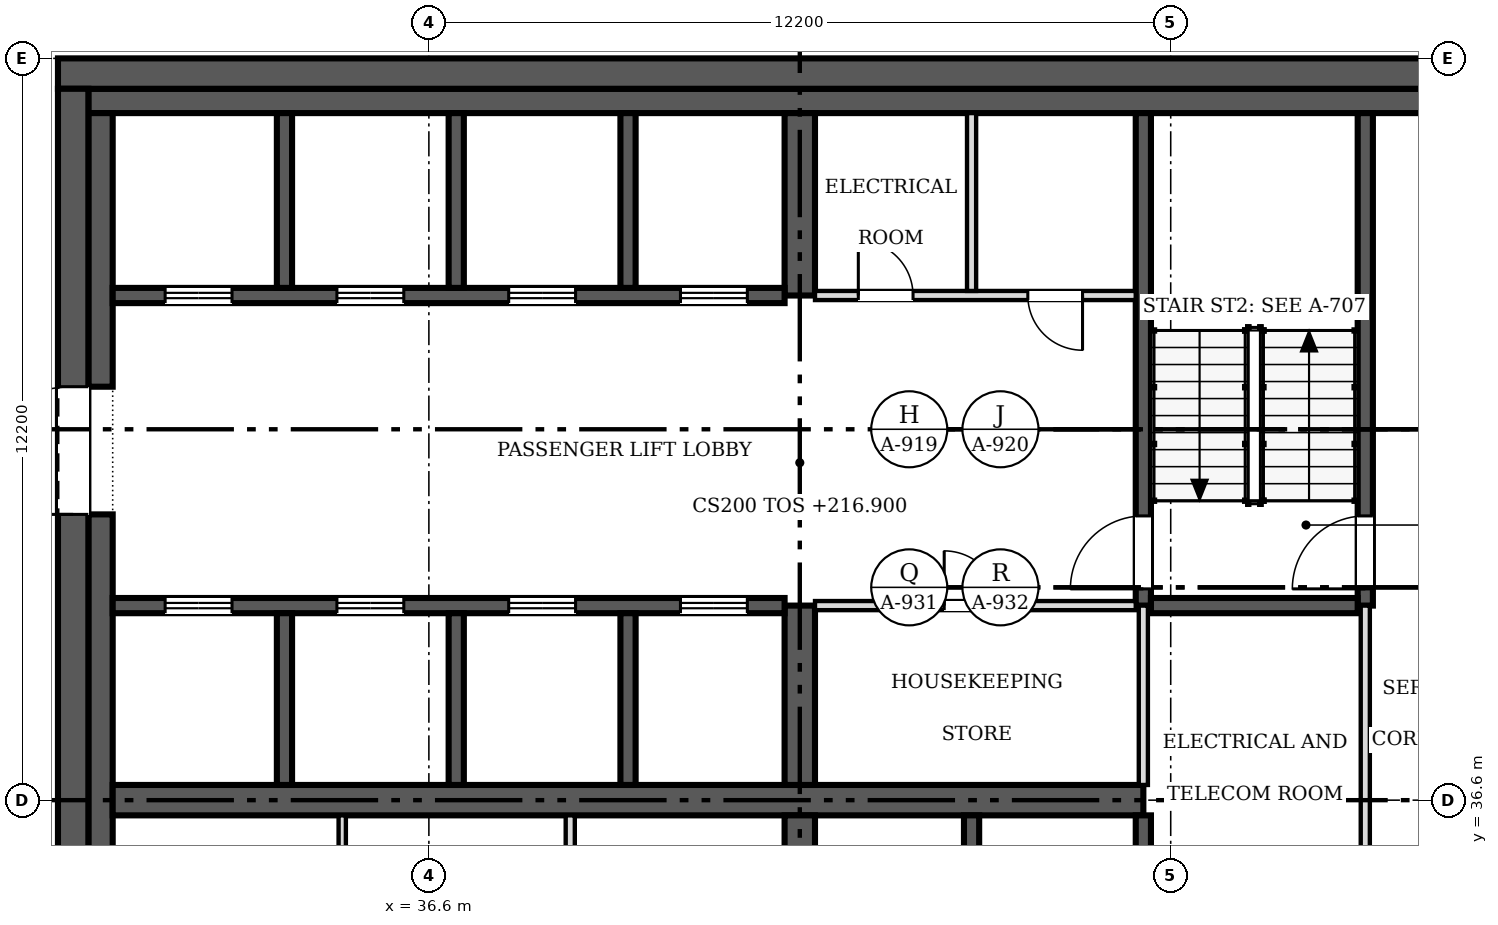
"""IFC4 building model, lengths in metres.
Left out: names, types, materials, properties, quantities, classifications, styles, units other than length and angle.
Written with IfcOpenShell. Run it as: python <this file> out.ifc"""

import sys

from ifc_helpers import new_model, si_unit, direction, frame, frame_2d, origin, place, context, subcontext, project, spatial, rectangle, extrude, source, transform, mapped, element, fill, save


model = new_model("IFC4")
c1 = context("Model", 3, precision=1e-05, world=origin(), true_north=direction((0.0, 1.0)))
c2 = subcontext(c1, "Body", "Model", "MODEL_VIEW")
j1 = project(units=[si_unit("LENGTHUNIT", "METRE"), si_unit("PLANEANGLEUNIT", "RADIAN")], contexts=[c1])
p1 = place(None, origin())
s1 = spatial("IfcSite", under=j1, at=p1, CompositionType="ELEMENT")
p2 = place(p1, origin())
s2 = spatial("IfcBuilding", under=s1, at=p2, CompositionType="ELEMENT")
p3 = place(p2, frame((0.0, 0.0, 216.9)))
s3 = spatial("IfcBuildingStorey", under=s2, at=p3, CompositionType="ELEMENT", Elevation=216.9)
p4 = place(p3, frame((30.75, 24.9, 0.0), z_axis=(0.0, 0.0, 1.0), x_axis=(0.0, 1.0, 0.0)))
e1 = element("IfcWall", 1, at=p4, inside=s3, PredefinedType="SHEAR", context=c2, shape_type="SweptSolid", body=[
    extrude(rectangle(XDim=23.4, YDim=0.5, at=frame_2d((11.7, 0.0))), origin(), (0.0, 0.0, 1.0), 3.8),
])
m1 = source(origin(), c2, "Body", "SweptSolid", [
    extrude(rectangle(XDim=2.1, YDim=2.4, at=frame_2d((1.05, 1.2))), frame((0.0, 0.26, 0.0), z_axis=(0.0, -1.0, 0.0), x_axis=(1.0, 0.0, 0.0)), (0.0, 0.0, 1.0), 0.52),
])
p5 = place(p4, frame((4.9, 0.0, 0.0)))
e2 = element("IfcOpeningElement", 2, at=p5, cuts=e1, PredefinedType="OPENING", context=c2, shape_type="MappedRepresentation", body=[
    mapped(m1, transform((0.0, 0.0, 0.0), scale=1.0)),
])
p6 = place(p4, frame((16.4, 0.0, 0.0)))
e3 = element("IfcOpeningElement", 3, at=p6, cuts=e1, PredefinedType="OPENING", context=c2, shape_type="MappedRepresentation", body=[
    mapped(m1, transform((0.0, 0.0, 0.0), scale=1.0)),
])
p7 = place(p3, frame((30.5, 48.55, 0.0), z_axis=(0.0, 0.0, 1.0), x_axis=(1.0, 0.0, 0.0)))
e4 = element("IfcWall", 4, at=p7, inside=s3, PredefinedType="SHEAR", context=c2, shape_type="SweptSolid", body=[
    extrude(rectangle(XDim=24.4, YDim=0.5, at=frame_2d((12.2, 0.0))), origin(), (0.0, 0.0, 1.0), 3.8),
])
p8 = place(p3, frame((31.0, 48.1, 0.0), z_axis=(0.0, 0.0, 1.0), x_axis=(1.0, 0.0, 0.0)))
e5 = element("IfcWall", 5, at=p8, inside=s3, PredefinedType="SOLIDWALL", context=c2, shape_type="SweptSolid", body=[
    extrude(rectangle(XDim=23.4, YDim=0.4, at=frame_2d((11.7, 0.0))), origin(), (0.0, 0.0, 1.0), 3.8),
])
p9 = place(p3, frame((31.2, 31.9, 0.0), z_axis=(0.0, 0.0, 1.0), x_axis=(0.0, 1.0, 0.0)))
e6 = element("IfcWall", 6, at=p9, inside=s3, PredefinedType="SOLIDWALL", context=c2, shape_type="SweptSolid", body=[
    extrude(rectangle(XDim=9.4, YDim=0.4, at=frame_2d((4.7, 0.0))), origin(), (0.0, 0.0, 1.0), 3.8),
])
p10 = place(p3, frame((31.2, 43.4, 0.0), z_axis=(0.0, 0.0, 1.0), x_axis=(0.0, 1.0, 0.0)))
e7 = element("IfcWall", 7, at=p10, inside=s3, PredefinedType="SOLIDWALL", context=c2, shape_type="SweptSolid", body=[
    extrude(rectangle(XDim=4.5, YDim=0.4, at=frame_2d((2.25, 0.0))), origin(), (0.0, 0.0, 1.0), 3.8),
])
p11 = place(p3, frame((31.4, 36.6, 0.0), z_axis=(0.0, 0.0, 1.0), x_axis=(1.0, 0.0, 0.0)))
e8 = element("IfcWall", 8, at=p11, inside=s3, PredefinedType="SHEAR", context=c2, shape_type="SweptSolid", body=[
    extrude(rectangle(XDim=16.95, YDim=0.5, at=frame_2d((8.475, 0.0))), origin(), (0.0, 0.0, 1.0), 3.8),
])
p12 = place(p3, frame((42.7, 36.35, 0.0), z_axis=(0.0, 0.0, 1.0), x_axis=(0.0, -1.0, 0.0)))
e9 = element("IfcWall", 9, at=p12, inside=s3, PredefinedType="SHEAR", context=c2, shape_type="SweptSolid", body=[
    extrude(rectangle(XDim=11.05, YDim=0.5, at=frame_2d((5.525, 0.0))), origin(), (0.0, 0.0, 1.0), 3.8),
])
m2 = source(origin(), c2, "Body", "SweptSolid", [
    extrude(rectangle(XDim=0.9, YDim=2.1, at=frame_2d((0.45, 1.05))), frame((0.0, 0.26, 0.0), z_axis=(0.0, -1.0, 0.0), x_axis=(1.0, 0.0, 0.0)), (0.0, 0.0, 1.0), 0.52),
])
p13 = place(p12, frame((6.5, 0.0, 0.0)))
e10 = element("IfcOpeningElement", 10, at=p13, cuts=e9, PredefinedType="OPENING", context=c2, shape_type="MappedRepresentation", body=[
    mapped(m2, transform((0.0, 0.0, 0.0), scale=1.0)),
])
m3 = source(origin(), c2, "Body", "SweptSolid", [
    extrude(rectangle(XDim=1.1, YDim=2.1, at=frame_2d((0.55, 1.05))), frame((0.0, 0.26, 0.0), z_axis=(0.0, -1.0, 0.0), x_axis=(1.0, 0.0, 0.0)), (0.0, 0.0, 1.0), 0.52),
])
p14 = place(p12, frame((3.8, 0.0, 0.0)))
e11 = element("IfcOpeningElement", 11, at=p14, cuts=e9, PredefinedType="OPENING", context=c2, shape_type="MappedRepresentation", body=[
    mapped(m3, transform((0.0, 0.0, 0.0), scale=1.0)),
])
p15 = place(p3, frame((42.7, 36.85, 0.0), z_axis=(0.0, 0.0, 1.0), x_axis=(0.0, 1.0, 0.0)))
e12 = element("IfcWall", 12, at=p15, inside=s3, PredefinedType="SHEAR", context=c2, shape_type="SweptSolid", body=[
    extrude(rectangle(XDim=2.95, YDim=0.5, at=frame_2d((1.475, 0.0))), origin(), (0.0, 0.0, 1.0), 3.8),
])
p16 = place(p3, frame((42.7, 44.9, 0.0), z_axis=(0.0, 0.0, 1.0), x_axis=(0.0, 1.0, 0.0)))
e13 = element("IfcWall", 13, at=p16, inside=s3, PredefinedType="SHEAR", context=c2, shape_type="SweptSolid", body=[
    extrude(rectangle(XDim=3.0, YDim=0.5, at=frame_2d((1.5, 0.0))), origin(), (0.0, 0.0, 1.0), 3.8),
])
p17 = place(p3, frame((31.4, 39.8, 0.0), z_axis=(0.0, 0.0, 1.0), x_axis=(1.0, 0.0, 0.0)))
e14 = element("IfcWall", 14, at=p17, inside=s3, PredefinedType="SOLIDWALL", context=c2, shape_type="SweptSolid", body=[
    extrude(rectangle(XDim=11.05, YDim=0.25, at=frame_2d((5.525, 0.0))), origin(), (0.0, 0.0, 1.0), 3.8),
])
m4 = source(origin(), c2, "Body", "SweptSolid", [
    extrude(rectangle(XDim=1.1, YDim=2.1, at=frame_2d((0.55, 1.05))), frame((0.0, 0.135, 0.0), z_axis=(0.0, -1.0, 0.0), x_axis=(1.0, 0.0, 0.0)), (0.0, 0.0, 1.0), 0.27),
])
p18 = place(p17, frame((0.863, 0.0, 0.0)))
e15 = element("IfcOpeningElement", 15, at=p18, cuts=e14, PredefinedType="OPENING", context=c2, shape_type="MappedRepresentation", body=[
    mapped(m4, transform((0.0, 0.0, 0.0), scale=1.0)),
])
p19 = place(p17, frame((3.688, 0.0, 0.0)))
e16 = element("IfcOpeningElement", 16, at=p19, cuts=e14, PredefinedType="OPENING", context=c2, shape_type="MappedRepresentation", body=[
    mapped(m4, transform((0.0, 0.0, 0.0), scale=1.0)),
])
p20 = place(p17, frame((6.512, 0.0, 0.0)))
e17 = element("IfcOpeningElement", 17, at=p20, cuts=e14, PredefinedType="OPENING", context=c2, shape_type="MappedRepresentation", body=[
    mapped(m4, transform((0.0, 0.0, 0.0), scale=1.0)),
])
p21 = place(p17, frame((9.337, 0.0, 0.0)))
e18 = element("IfcOpeningElement", 18, at=p21, cuts=e14, PredefinedType="OPENING", context=c2, shape_type="MappedRepresentation", body=[
    mapped(m4, transform((0.0, 0.0, 0.0), scale=1.0)),
])
p22 = place(p3, frame((42.45, 44.9, 0.0), z_axis=(0.0, 0.0, 1.0), x_axis=(-1.0, 0.0, 0.0)))
e19 = element("IfcWall", 19, at=p22, inside=s3, PredefinedType="SOLIDWALL", context=c2, shape_type="SweptSolid", body=[
    extrude(rectangle(XDim=11.05, YDim=0.25, at=frame_2d((5.525, 0.0))), origin(), (0.0, 0.0, 1.0), 3.8),
])
p23 = place(p22, frame((9.087, 0.0, 0.0)))
e20 = element("IfcOpeningElement", 20, at=p23, cuts=e19, PredefinedType="OPENING", context=c2, shape_type="MappedRepresentation", body=[
    mapped(m4, transform((0.0, 0.0, 0.0), scale=1.0)),
])
p24 = place(p22, frame((6.262, 0.0, 0.0)))
e21 = element("IfcOpeningElement", 21, at=p24, cuts=e19, PredefinedType="OPENING", context=c2, shape_type="MappedRepresentation", body=[
    mapped(m4, transform((0.0, 0.0, 0.0), scale=1.0)),
])
p25 = place(p22, frame((3.438, 0.0, 0.0)))
e22 = element("IfcOpeningElement", 22, at=p25, cuts=e19, PredefinedType="OPENING", context=c2, shape_type="MappedRepresentation", body=[
    mapped(m4, transform((0.0, 0.0, 0.0), scale=1.0)),
])
p26 = place(p22, frame((0.613, 0.0, 0.0)))
e23 = element("IfcOpeningElement", 23, at=p26, cuts=e19, PredefinedType="OPENING", context=c2, shape_type="MappedRepresentation", body=[
    mapped(m4, transform((0.0, 0.0, 0.0), scale=1.0)),
])
p27 = place(p3, frame((48.35, 36.35, 0.0), z_axis=(0.0, 0.0, 1.0), x_axis=(0.0, -1.0, 0.0)))
e24 = element("IfcWall", 24, at=p27, inside=s3, PredefinedType="SOLIDWALL", context=c2, shape_type="SweptSolid", body=[
    extrude(rectangle(XDim=11.05, YDim=0.25, at=frame_2d((5.525, 0.0))), origin(), (0.0, 0.0, 1.0), 3.8),
])
m5 = source(origin(), c2, "Body", "SweptSolid", [
    extrude(rectangle(XDim=1.2, YDim=2.1, at=frame_2d((0.6, 1.05))), frame((0.0, 0.135, 0.0), z_axis=(0.0, -1.0, 0.0), x_axis=(1.0, 0.0, 0.0)), (0.0, 0.0, 1.0), 0.27),
])
p28 = place(p27, frame((3.225, 0.0, 0.0)))
e25 = element("IfcOpeningElement", 25, at=p28, cuts=e24, PredefinedType="OPENING", context=c2, shape_type="MappedRepresentation", body=[
    mapped(m5, transform((0.0, 0.0, 0.0), scale=1.0)),
])
p29 = place(p3, frame((48.35, 47.9, 0.0), z_axis=(0.0, 0.0, 1.0), x_axis=(0.0, -1.0, 0.0)))
e26 = element("IfcWall", 26, at=p29, inside=s3, PredefinedType="SOLIDWALL", context=c2, shape_type="SweptSolid", body=[
    extrude(rectangle(XDim=8.1, YDim=0.25, at=frame_2d((4.05, 0.0))), origin(), (0.0, 0.0, 1.0), 3.8),
])
p30 = place(p29, frame((6.625, 0.0, 0.0)))
e27 = element("IfcOpeningElement", 27, at=p30, cuts=e26, PredefinedType="OPENING", context=c2, shape_type="MappedRepresentation", body=[
    mapped(m5, transform((0.0, 0.0, 0.0), scale=1.0)),
])
p31 = place(p3, frame((52.0, 39.8, 0.0), z_axis=(0.0, 0.0, 1.0), x_axis=(0.0, 1.0, 0.0)))
e28 = element("IfcWall", 28, at=p31, inside=s3, PredefinedType="SOLIDWALL", context=c2, shape_type="SweptSolid", body=[
    extrude(rectangle(XDim=8.1, YDim=0.25, at=frame_2d((4.05, 0.0))), origin(), (0.0, 0.0, 1.0), 3.8),
])
p32 = place(p31, frame((0.275, 0.0, 0.0)))
e29 = element("IfcOpeningElement", 29, at=p32, cuts=e28, PredefinedType="OPENING", context=c2, shape_type="MappedRepresentation", body=[
    mapped(m5, transform((0.0, 0.0, 0.0), scale=1.0)),
])
p33 = place(p3, frame((48.475, 39.8, 0.0), z_axis=(0.0, 0.0, 1.0), x_axis=(1.0, 0.0, 0.0)))
e30 = element("IfcWall", 30, at=p33, inside=s3, PredefinedType="SOLIDWALL", context=c2, shape_type="SweptSolid", body=[
    extrude(rectangle(XDim=3.4, YDim=0.25, at=frame_2d((1.7, 0.0))), origin(), (0.0, 0.0, 1.0), 3.8),
])
for number, where, z_axis, x_axis in (
    (31, (34.225, 36.85, 0.0), (0.0, 0.0, 1.0), (0.0, 1.0, 0.0)),
    (32, (37.05, 36.85, 0.0), (0.0, 0.0, 1.0), (0.0, 1.0, 0.0)),
    (33, (39.875, 36.85, 0.0), (0.0, 0.0, 1.0), (0.0, 1.0, 0.0)),
):
    element("IfcWall", number, at=place(p3, frame(where, z_axis=z_axis, x_axis=x_axis)), inside=s3, PredefinedType="SOLIDWALL", context=c2, shape_type="SweptSolid", body=[
        extrude(rectangle(XDim=2.825, YDim=0.25, at=frame_2d((1.413, 0.0))), origin(), (0.0, 0.0, 1.0), 3.8),
    ])
p34 = place(p3, frame((45.525, 33.525, 0.0), z_axis=(0.0, 0.0, 1.0), x_axis=(0.0, 1.0, 0.0)))
e34 = element("IfcWall", 34, at=p34, inside=s3, PredefinedType="SOLIDWALL", context=c2, shape_type="SweptSolid", body=[
    extrude(rectangle(XDim=2.825, YDim=0.25, at=frame_2d((1.413, 0.0))), origin(), (0.0, 0.0, 1.0), 3.8),
])
for number, where, z_axis, x_axis in (
    (35, (34.225, 45.025, 0.0), (0.0, 0.0, 1.0), (0.0, 1.0, 0.0)),
    (36, (37.05, 45.025, 0.0), (0.0, 0.0, 1.0), (0.0, 1.0, 0.0)),
    (37, (39.875, 45.025, 0.0), (0.0, 0.0, 1.0), (0.0, 1.0, 0.0)),
):
    element("IfcWall", number, at=place(p3, frame(where, z_axis=z_axis, x_axis=x_axis)), inside=s3, PredefinedType="SOLIDWALL", context=c2, shape_type="SweptSolid", body=[
        extrude(rectangle(XDim=2.875, YDim=0.25, at=frame_2d((1.438, 0.0))), origin(), (0.0, 0.0, 1.0), 3.8),
    ])
p35 = place(p3, frame((52.0, 33.525, 0.0), z_axis=(0.0, 0.0, 1.0), x_axis=(0.0, 1.0, 0.0)))
e38 = element("IfcWall", 38, at=p35, inside=s3, PredefinedType="PARTITIONING", context=c2, shape_type="SweptSolid", body=[
    extrude(rectangle(XDim=6.275, YDim=0.15, at=frame_2d((3.138, 0.0))), origin(), (0.0, 0.0, 1.0), 3.6),
])
m6 = source(origin(), c2, "Body", "SweptSolid", [
    extrude(rectangle(XDim=0.9, YDim=2.1, at=frame_2d((0.45, 1.05))), frame((0.0, 0.085, 0.0), z_axis=(0.0, -1.0, 0.0), x_axis=(1.0, 0.0, 0.0)), (0.0, 0.0, 1.0), 0.17),
])
p36 = place(p35, frame((1.025, 0.0, 0.0)))
e39 = element("IfcOpeningElement", 39, at=p36, cuts=e38, PredefinedType="OPENING", context=c2, shape_type="MappedRepresentation", body=[
    mapped(m6, transform((0.0, 0.0, 0.0), scale=1.0)),
])
p37 = place(p3, frame((48.225, 39.8, 0.0), z_axis=(0.0, 0.0, 1.0), x_axis=(-1.0, 0.0, 0.0)))
e40 = element("IfcWall", 40, at=p37, inside=s3, PredefinedType="PARTITIONING", context=c2, shape_type="SweptSolid", body=[
    extrude(rectangle(XDim=5.275, YDim=0.15, at=frame_2d((2.638, 0.0))), origin(), (0.0, 0.0, 1.0), 3.6),
])
p38 = place(p37, frame((2.25, 0.0, 0.0)))
e41 = element("IfcOpeningElement", 41, at=p38, cuts=e40, PredefinedType="OPENING", context=c2, shape_type="MappedRepresentation", body=[
    mapped(m6, transform((0.0, 0.0, 0.0), scale=1.0)),
])
p39 = place(p3, frame((42.95, 44.9, 0.0), z_axis=(0.0, 0.0, 1.0), x_axis=(1.0, 0.0, 0.0)))
e42 = element("IfcWall", 42, at=p39, inside=s3, PredefinedType="PARTITIONING", context=c2, shape_type="SweptSolid", body=[
    extrude(rectangle(XDim=5.275, YDim=0.15, at=frame_2d((2.638, 0.0))), origin(), (0.0, 0.0, 1.0), 3.6),
])
p40 = place(p39, frame((0.712, 0.0, 0.0)))
e43 = element("IfcOpeningElement", 43, at=p40, cuts=e42, PredefinedType="OPENING", context=c2, shape_type="MappedRepresentation", body=[
    mapped(m6, transform((0.0, 0.0, 0.0), scale=1.0)),
])
p41 = place(p39, frame((3.5, 0.0, 0.0)))
e44 = element("IfcOpeningElement", 44, at=p41, cuts=e42, PredefinedType="OPENING", context=c2, shape_type="MappedRepresentation", body=[
    mapped(m6, transform((0.0, 0.0, 0.0), scale=1.0)),
])
p42 = place(p3, frame((48.35, 36.85, 0.0), z_axis=(0.0, 0.0, 1.0), x_axis=(0.0, 1.0, 0.0)))
e45 = element("IfcWall", 45, at=p42, inside=s3, PredefinedType="PARTITIONING", context=c2, shape_type="SweptSolid", body=[
    extrude(rectangle(XDim=2.95, YDim=0.15, at=frame_2d((1.475, 0.0))), origin(), (0.0, 0.0, 1.0), 3.6),
])
p43 = place(p3, frame((35.175, 33.46, 0.0), z_axis=(0.0, 0.0, 1.0), x_axis=(0.0, 1.0, 0.0)))
e46 = element("IfcWall", 46, at=p43, inside=s3, PredefinedType="PARTITIONING", context=c2, shape_type="SweptSolid", body=[
    extrude(rectangle(XDim=2.89, YDim=0.12, at=frame_2d((1.445, 0.0))), origin(), (0.0, 0.0, 1.0), 3.6),
])
p44 = place(p3, frame((38.925, 33.475, 0.0), z_axis=(0.0, 0.0, 1.0), x_axis=(0.0, 1.0, 0.0)))
e47 = element("IfcWall", 47, at=p44, inside=s3, PredefinedType="PARTITIONING", context=c2, shape_type="SweptSolid", body=[
    extrude(rectangle(XDim=2.875, YDim=0.15, at=frame_2d((1.438, 0.0))), origin(), (0.0, 0.0, 1.0), 3.6),
])
p45 = place(p3, frame((45.525, 44.975, 0.0), z_axis=(0.0, 0.0, 1.0), x_axis=(0.0, 1.0, 0.0)))
e48 = element("IfcWall", 48, at=p45, inside=s3, PredefinedType="PARTITIONING", context=c2, shape_type="SweptSolid", body=[
    extrude(rectangle(XDim=2.925, YDim=0.15, at=frame_2d((1.462, 0.0))), origin(), (0.0, 0.0, 1.0), 3.6),
])
m7 = source(origin(), c2, "Body", "SweptSolid", [
    extrude(rectangle(XDim=2.1, YDim=2.4, at=frame_2d((1.05, 1.2))), frame((0.0, 0.025, 0.0), z_axis=(0.0, -1.0, 0.0), x_axis=(1.0, 0.0, 0.0)), (0.0, 0.0, 1.0), 0.05),
])
p46 = place(p6, origin())
e49 = element("IfcDoor", 49, at=p46, inside=s3, OperationType="DOUBLE_DOOR_SINGLE_SWING", PredefinedType="DOOR", context=c2, shape_type="MappedRepresentation", body=[
    mapped(m7, transform((0.0, 0.0, 0.0), scale=1.0)),
])
fill(e3, e49)
m8 = source(origin(), c2, "Body", "SweptSolid", [
    extrude(rectangle(XDim=1.1, YDim=2.1, at=frame_2d((0.55, 1.05))), frame((0.0, 0.025, 0.0), z_axis=(0.0, -1.0, 0.0), x_axis=(1.0, 0.0, 0.0)), (0.0, 0.0, 1.0), 0.05),
])
p47 = place(p18, origin())
e50 = element("IfcDoor", 50, at=p47, inside=s3, OperationType="DOUBLE_DOOR_SLIDING", PredefinedType="DOOR", context=c2, shape_type="MappedRepresentation", body=[
    mapped(m8, transform((0.0, 0.0, 0.0), scale=1.0)),
])
fill(e15, e50)
p48 = place(p19, origin())
e51 = element("IfcDoor", 51, at=p48, inside=s3, OperationType="DOUBLE_DOOR_SLIDING", PredefinedType="DOOR", context=c2, shape_type="MappedRepresentation", body=[
    mapped(m8, transform((0.0, 0.0, 0.0), scale=1.0)),
])
fill(e16, e51)
p49 = place(p20, origin())
e52 = element("IfcDoor", 52, at=p49, inside=s3, OperationType="DOUBLE_DOOR_SLIDING", PredefinedType="DOOR", context=c2, shape_type="MappedRepresentation", body=[
    mapped(m8, transform((0.0, 0.0, 0.0), scale=1.0)),
])
fill(e17, e52)
p50 = place(p21, origin())
e53 = element("IfcDoor", 53, at=p50, inside=s3, OperationType="DOUBLE_DOOR_SLIDING", PredefinedType="DOOR", context=c2, shape_type="MappedRepresentation", body=[
    mapped(m8, transform((0.0, 0.0, 0.0), scale=1.0)),
])
fill(e18, e53)
p51 = place(p23, origin())
e54 = element("IfcDoor", 54, at=p51, inside=s3, OperationType="DOUBLE_DOOR_SLIDING", PredefinedType="DOOR", context=c2, shape_type="MappedRepresentation", body=[
    mapped(m8, transform((0.0, 0.0, 0.0), scale=1.0)),
])
fill(e20, e54)
p52 = place(p24, origin())
e55 = element("IfcDoor", 55, at=p52, inside=s3, OperationType="DOUBLE_DOOR_SLIDING", PredefinedType="DOOR", context=c2, shape_type="MappedRepresentation", body=[
    mapped(m8, transform((0.0, 0.0, 0.0), scale=1.0)),
])
fill(e21, e55)
p53 = place(p25, origin())
e56 = element("IfcDoor", 56, at=p53, inside=s3, OperationType="DOUBLE_DOOR_SLIDING", PredefinedType="DOOR", context=c2, shape_type="MappedRepresentation", body=[
    mapped(m8, transform((0.0, 0.0, 0.0), scale=1.0)),
])
fill(e22, e56)
p54 = place(p26, origin())
e57 = element("IfcDoor", 57, at=p54, inside=s3, OperationType="DOUBLE_DOOR_SLIDING", PredefinedType="DOOR", context=c2, shape_type="MappedRepresentation", body=[
    mapped(m8, transform((0.0, 0.0, 0.0), scale=1.0)),
])
fill(e23, e57)
m9 = source(origin(), c2, "Body", "SweptSolid", [
    extrude(rectangle(XDim=1.2, YDim=2.1, at=frame_2d((0.6, 1.05))), frame((0.0, 0.025, 0.0), z_axis=(0.0, -1.0, 0.0), x_axis=(1.0, 0.0, 0.0)), (0.0, 0.0, 1.0), 0.05),
])
p55 = place(p30, origin())
e58 = element("IfcDoor", 58, at=p55, inside=s3, OperationType="SINGLE_SWING_RIGHT", PredefinedType="DOOR", context=c2, shape_type="MappedRepresentation", body=[
    mapped(m9, transform((0.0, 0.0, 0.0), scale=1.0)),
])
fill(e27, e58)
p56 = place(p32, origin())
e59 = element("IfcDoor", 59, at=p56, inside=s3, OperationType="SINGLE_SWING_LEFT", PredefinedType="DOOR", context=c2, shape_type="MappedRepresentation", body=[
    mapped(m9, transform((0.0, 0.0, 0.0), scale=1.0)),
])
fill(e29, e59)
m10 = source(origin(), c2, "Body", "SweptSolid", [
    extrude(rectangle(XDim=0.9, YDim=2.1, at=frame_2d((0.45, 1.05))), frame((0.0, 0.025, 0.0), z_axis=(0.0, -1.0, 0.0), x_axis=(1.0, 0.0, 0.0)), (0.0, 0.0, 1.0), 0.05),
])
p57 = place(p38, origin())
e60 = element("IfcDoor", 60, at=p57, inside=s3, OperationType="SINGLE_SWING_RIGHT", PredefinedType="DOOR", context=c2, shape_type="MappedRepresentation", body=[
    mapped(m10, transform((0.0, 0.0, 0.0), scale=1.0)),
])
fill(e41, e60)
p58 = place(p40, origin())
e61 = element("IfcDoor", 61, at=p58, inside=s3, OperationType="SINGLE_SWING_LEFT", PredefinedType="DOOR", context=c2, shape_type="MappedRepresentation", body=[
    mapped(m10, transform((0.0, 0.0, 0.0), scale=1.0)),
])
fill(e43, e61)
p59 = place(p41, origin())
e62 = element("IfcDoor", 62, at=p59, inside=s3, OperationType="SINGLE_SWING_RIGHT", PredefinedType="DOOR", context=c2, shape_type="MappedRepresentation", body=[
    mapped(m10, transform((0.0, 0.0, 0.0), scale=1.0)),
])
fill(e44, e62)
save(model, sys.argv[1])
